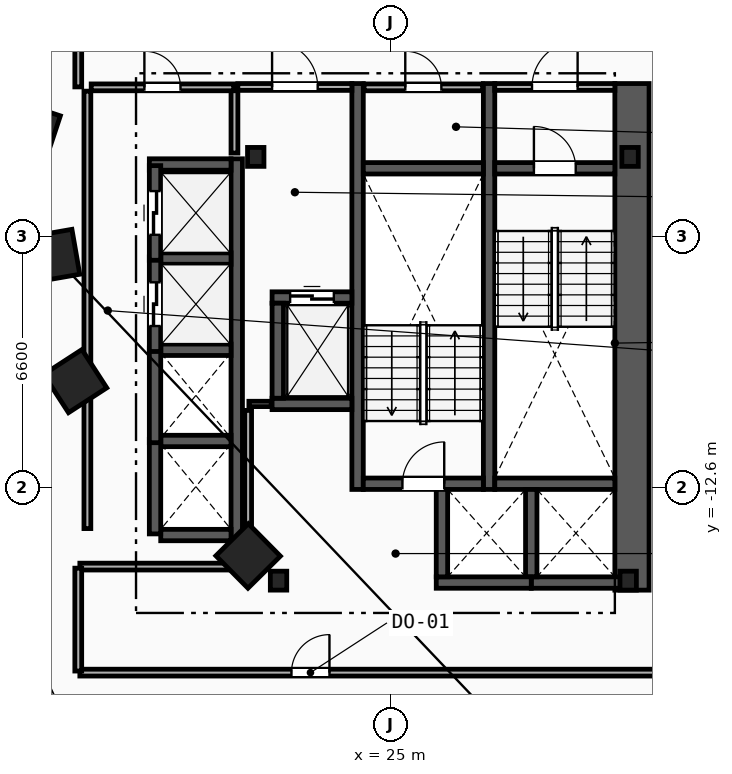
"""IFC4 building model, lengths in metres.
Left out: names, types, materials, properties, quantities, classifications, styles, units other than length and angle.
Written with IfcOpenShell. Run it as: python <this file> out.ifc"""

import sys

from ifc_helpers import new_model, si_unit, direction, frame, frame_2d, origin, origin_2d, place, context, subcontext, project, spatial, rectangle, i_section, extrude, element, fill, save


model = new_model("IFC4")
c1 = context("Model", 3, precision=1e-05, world=origin(), true_north=direction((0.0, 1.0)))
c2 = subcontext(c1, "Body", "Model", "MODEL_VIEW")
j1 = project(units=[si_unit("LENGTHUNIT", "METRE"), si_unit("PLANEANGLEUNIT", "RADIAN")], contexts=[c1])
p1 = place(None, origin())
s1 = spatial("IfcSite", under=j1, at=p1, CompositionType="ELEMENT")
p2 = place(p1, origin())
s2 = spatial("IfcBuilding", under=s1, at=p2, CompositionType="ELEMENT")
p3 = place(p2, frame((0.0, 0.0, 46.8)))
s3 = spatial("IfcBuildingStorey", under=s2, at=p3, CompositionType="ELEMENT", Elevation=46.8)
for number, where, z_axis, x_axis in (
    (1, (31.3, -3.9, 0.0), (0.0, 0.0, 1.0), (1.0, 0.0, 0.0)),
    (2, (21.45, -3.9, 0.0), (0.0, 0.0, 1.0), (1.0, 0.0, 0.0)),
    (3, (22.05, -15.05, 0.0), (0.0, 0.0, 1.0), (1.0, 0.0, 0.0)),
    (4, (31.25, -15.05, 0.0), (0.0, 0.0, 1.0), (1.0, 0.0, 0.0)),
):
    element("IfcColumn", number, at=place(p3, frame(where, z_axis=z_axis, x_axis=x_axis)), inside=s3, PredefinedType="COLUMN", context=c2, shape_type="SweptSolid", body=[
        extrude(i_section(OverallWidth=0.432, OverallDepth=0.498, WebThickness=0.056, FlangeThickness=0.089, FilletRadius=0.018, at=origin_2d()), origin(), (0.0, 0.0, 1.0), 3.8),
    ])
for number, where, z_axis, x_axis in (
    (5, (15.55, -3.2, 0.0), (0.0, 0.0, 1.0), (-0.315, -0.949, 0.0)),
    (6, (16.125, -6.5, 0.0), (0.0, 0.0, 1.0), (0.172, -0.985, 0.0)),
    (7, (16.7, -9.8, 0.0), (0.0, 0.0, 1.0), (0.544, -0.839, 0.0)),
    (8, (21.25, -14.4, 0.0), (0.0, 0.0, 1.0), (0.703, -0.711, 0.0)),
):
    element("IfcColumn", number, at=place(p3, frame(where, z_axis=z_axis, x_axis=x_axis)), inside=s3, PredefinedType="COLUMN", context=c2, shape_type="SweptSolid", body=[
        extrude(rectangle(XDim=1.2, YDim=1.2, at=origin_2d()), origin(), (0.0, 0.0, 1.0), 3.8),
    ])
p4 = place(p3, frame((31.35, -15.3, 0.0), z_axis=(0.0, 0.0, 1.0), x_axis=(0.0, 1.0, 0.0)))
e9 = element("IfcWall", 9, at=p4, inside=s3, PredefinedType="SHEAR", context=c2, shape_type="SweptSolid", body=[
    extrude(rectangle(XDim=13.33, YDim=0.9, at=frame_2d((6.665, 0.0))), origin(), (0.0, 0.0, 1.0), 3.5),
])
for number, where, z_axis, x_axis in (
    (10, (27.59, -12.65, 0.0), (0.0, 0.0, 1.0), (0.0, 1.0, 0.0)),
    (11, (24.13, -12.65, 0.0), (0.0, 0.0, 1.0), (0.0, 1.0, 0.0)),
):
    element("IfcWall", number, at=place(p3, frame(where, z_axis=z_axis, x_axis=x_axis)), inside=s3, PredefinedType="SHEAR", context=c2, shape_type="SweptSolid", body=[
        extrude(rectangle(XDim=10.68, YDim=0.3, at=frame_2d((5.34, 0.0))), origin(), (0.0, 0.0, 1.0), 3.5),
    ])
p5 = place(p3, frame((27.74, -4.2, 0.0), z_axis=(0.0, 0.0, 1.0), x_axis=(1.0, 0.0, 0.0)))
e12 = element("IfcWall", 12, at=p5, inside=s3, PredefinedType="SHEAR", context=c2, shape_type="SweptSolid", body=[
    extrude(rectangle(XDim=3.16, YDim=0.3, at=frame_2d((1.58, 0.0))), origin(), (0.0, 0.0, 1.0), 3.5),
])
p6 = place(p5, frame((1.03, 0.0, 0.0)))
e13 = element("IfcOpeningElement", 13, at=p6, cuts=e12, PredefinedType="OPENING", context=c2, shape_type="SweptSolid", body=[
    extrude(rectangle(XDim=1.1, YDim=2.15, at=frame_2d((0.55, 1.075))), frame((0.0, 0.16, 0.0), z_axis=(0.0, -1.0, 0.0), x_axis=(1.0, 0.0, 0.0)), (0.0, 0.0, 1.0), 0.32),
])
p7 = place(p3, frame((27.74, -12.5, 0.0), z_axis=(0.0, 0.0, 1.0), x_axis=(1.0, 0.0, 0.0)))
e14 = element("IfcWall", 14, at=p7, inside=s3, PredefinedType="SHEAR", context=c2, shape_type="SweptSolid", body=[
    extrude(rectangle(XDim=3.16, YDim=0.3, at=frame_2d((1.58, 0.0))), origin(), (0.0, 0.0, 1.0), 3.5),
])
p8 = place(p3, frame((24.28, -12.5, 0.0), z_axis=(0.0, 0.0, 1.0), x_axis=(1.0, 0.0, 0.0)))
e15 = element("IfcWall", 15, at=p8, inside=s3, PredefinedType="SHEAR", context=c2, shape_type="SweptSolid", body=[
    extrude(rectangle(XDim=3.16, YDim=0.3, at=frame_2d((1.58, 0.0))), origin(), (0.0, 0.0, 1.0), 3.5),
])
p9 = place(p8, frame((1.03, 0.0, 0.0)))
e16 = element("IfcOpeningElement", 16, at=p9, cuts=e15, PredefinedType="OPENING", context=c2, shape_type="SweptSolid", body=[
    extrude(rectangle(XDim=1.1, YDim=2.15, at=frame_2d((0.55, 1.075))), frame((0.0, 0.16, 0.0), z_axis=(0.0, -1.0, 0.0), x_axis=(1.0, 0.0, 0.0)), (0.0, 0.0, 1.0), 0.32),
])
p10 = place(p3, frame((24.28, -4.2, 0.0), z_axis=(0.0, 0.0, 1.0), x_axis=(1.0, 0.0, 0.0)))
e17 = element("IfcWall", 17, at=p10, inside=s3, PredefinedType="SHEAR", context=c2, shape_type="SweptSolid", body=[
    extrude(rectangle(XDim=3.16, YDim=0.3, at=frame_2d((1.58, 0.0))), origin(), (0.0, 0.0, 1.0), 3.5),
])
p11 = place(p3, frame((20.89, -3.8, 0.0), z_axis=(0.0, 0.0, 1.0), x_axis=(0.0, 1.0, 0.0)))
e18 = element("IfcWall", 18, at=p11, inside=s3, PredefinedType="PARTITIONING", context=c2, shape_type="SweptSolid", body=[
    extrude(rectangle(XDim=1.65, YDim=0.18, at=frame_2d((0.825, 0.0))), origin(), (0.0, 0.0, 1.0), 3.5),
])
p12 = place(p3, frame((20.98, -2.06, 0.0), z_axis=(0.0, 0.0, 1.0), x_axis=(1.0, 0.0, 0.0)))
e19 = element("IfcWall", 19, at=p12, inside=s3, PredefinedType="PARTITIONING", context=c2, shape_type="SweptSolid", body=[
    extrude(rectangle(XDim=3.0, YDim=0.18, at=frame_2d((1.5, 0.0))), origin(), (0.0, 0.0, 1.0), 3.5),
])
p13 = place(p12, frame((0.9, 0.0, 0.0)))
e20 = element("IfcOpeningElement", 20, at=p13, cuts=e19, PredefinedType="OPENING", context=c2, shape_type="SweptSolid", body=[
    extrude(rectangle(XDim=1.2, YDim=2.15, at=frame_2d((0.6, 1.075))), frame((0.0, 0.1, 0.0), z_axis=(0.0, -1.0, 0.0), x_axis=(1.0, 0.0, 0.0)), (0.0, 0.0, 1.0), 0.2),
])
p14 = place(p3, frame((27.74, -2.06, 0.0), z_axis=(0.0, 0.0, 1.0), x_axis=(1.0, 0.0, 0.0)))
e21 = element("IfcWall", 21, at=p14, inside=s3, PredefinedType="PARTITIONING", context=c2, shape_type="SweptSolid", body=[
    extrude(rectangle(XDim=3.16, YDim=0.18, at=frame_2d((1.58, 0.0))), origin(), (0.0, 0.0, 1.0), 3.5),
])
p15 = place(p14, frame((0.98, 0.0, 0.0)))
e22 = element("IfcOpeningElement", 22, at=p15, cuts=e21, PredefinedType="OPENING", context=c2, shape_type="SweptSolid", body=[
    extrude(rectangle(XDim=1.2, YDim=2.15, at=frame_2d((0.6, 1.075))), frame((0.0, 0.1, 0.0), z_axis=(0.0, -1.0, 0.0), x_axis=(1.0, 0.0, 0.0)), (0.0, 0.0, 1.0), 0.2),
])
p16 = place(p3, frame((21.88, -7.6, 0.0), z_axis=(0.0, 0.0, 1.0), x_axis=(1.0, 0.0, 0.0)))
e23 = element("IfcWall", 23, at=p16, inside=s3, PredefinedType="SHEAR", context=c2, shape_type="SweptSolid", body=[
    extrude(rectangle(XDim=2.1, YDim=0.3, at=frame_2d((1.05, 0.0))), origin(), (0.0, 0.0, 1.0), 3.5),
])
p17 = place(p16, frame((0.475, 0.0, 0.0)))
e24 = element("IfcOpeningElement", 24, at=p17, cuts=e23, PredefinedType="OPENING", context=c2, shape_type="SweptSolid", body=[
    extrude(rectangle(XDim=1.15, YDim=2.2, at=frame_2d((0.575, 1.1))), frame((0.0, 0.16, 0.0), z_axis=(0.0, -1.0, 0.0), x_axis=(1.0, 0.0, 0.0)), (0.0, 0.0, 1.0), 0.32),
])
p18 = place(p3, frame((21.88, -10.4, 0.0), z_axis=(0.0, 0.0, 1.0), x_axis=(1.0, 0.0, 0.0)))
e25 = element("IfcWall", 25, at=p18, inside=s3, PredefinedType="SHEAR", context=c2, shape_type="SweptSolid", body=[
    extrude(rectangle(XDim=2.1, YDim=0.3, at=frame_2d((1.05, 0.0))), origin(), (0.0, 0.0, 1.0), 3.5),
])
for number, where, z_axis, x_axis in (
    (26, (22.03, -10.25, 0.0), (0.0, 0.0, 1.0), (0.0, 1.0, 0.0)),
    (27, (28.7, -15.1, 0.0), (0.0, 0.0, 1.0), (1.0, 0.0, 0.0)),
):
    element("IfcWall", number, at=place(p3, frame(where, z_axis=z_axis, x_axis=x_axis)), inside=s3, PredefinedType="SHEAR", context=c2, shape_type="SweptSolid", body=[
        extrude(rectangle(XDim=2.5, YDim=0.3, at=frame_2d((1.25, 0.0))), origin(), (0.0, 0.0, 1.0), 3.5),
    ])
p19 = place(p3, frame((28.7, -14.95, 0.0), z_axis=(0.0, 0.0, 1.0), x_axis=(0.0, 1.0, 0.0)))
e28 = element("IfcWall", 28, at=p19, inside=s3, PredefinedType="SHEAR", context=c2, shape_type="SweptSolid", body=[
    extrude(rectangle(XDim=2.3, YDim=0.3, at=frame_2d((1.15, 0.0))), origin(), (0.0, 0.0, 1.0), 3.5),
])
p20 = place(p3, frame((26.2, -15.1, 0.0), z_axis=(0.0, 0.0, 1.0), x_axis=(1.0, 0.0, 0.0)))
e29 = element("IfcWall", 29, at=p20, inside=s3, PredefinedType="SHEAR", context=c2, shape_type="SweptSolid", body=[
    extrude(rectangle(XDim=2.5, YDim=0.3, at=frame_2d((1.25, 0.0))), origin(), (0.0, 0.0, 1.0), 3.5),
])
p21 = place(p3, frame((26.35, -14.95, 0.0), z_axis=(0.0, 0.0, 1.0), x_axis=(0.0, 1.0, 0.0)))
e30 = element("IfcWall", 30, at=p21, inside=s3, PredefinedType="SHEAR", context=c2, shape_type="SweptSolid", body=[
    extrude(rectangle(XDim=2.3, YDim=0.3, at=frame_2d((1.15, 0.0))), origin(), (0.0, 0.0, 1.0), 3.5),
])
p22 = place(p3, frame((20.95, -14.0, 0.0), z_axis=(0.0, 0.0, 1.0), x_axis=(0.0, 1.0, 0.0)))
e31 = element("IfcWall", 31, at=p22, inside=s3, PredefinedType="SHEAR", context=c2, shape_type="SweptSolid", body=[
    extrude(rectangle(XDim=10.05, YDim=0.3, at=frame_2d((5.025, 0.0))), origin(), (0.0, 0.0, 1.0), 3.5),
])
p23 = place(p3, frame((18.95, -13.85, 0.0), z_axis=(0.0, 0.0, 1.0), x_axis=(1.0, 0.0, 0.0)))
e32 = element("IfcWall", 32, at=p23, inside=s3, PredefinedType="SHEAR", context=c2, shape_type="SweptSolid", body=[
    extrude(rectangle(XDim=1.85, YDim=0.3, at=frame_2d((0.925, 0.0))), origin(), (0.0, 0.0, 1.0), 3.5),
])
p24 = place(p3, frame((18.65, -4.1, 0.0), z_axis=(0.0, 0.0, 1.0), x_axis=(1.0, 0.0, 0.0)))
e33 = element("IfcWall", 33, at=p24, inside=s3, PredefinedType="SHEAR", context=c2, shape_type="SweptSolid", body=[
    extrude(rectangle(XDim=2.15, YDim=0.3, at=frame_2d((1.075, 0.0))), origin(), (0.0, 0.0, 1.0), 3.5),
])
for number, where, z_axis, x_axis in (
    (34, (18.95, -11.375, 0.0), (0.0, 0.0, 1.0), (1.0, 0.0, 0.0)),
    (35, (18.95, -8.975, 0.0), (0.0, 0.0, 1.0), (1.0, 0.0, 0.0)),
    (36, (18.95, -6.575, 0.0), (0.0, 0.0, 1.0), (1.0, 0.0, 0.0)),
):
    element("IfcWall", number, at=place(p3, frame(where, z_axis=z_axis, x_axis=x_axis)), inside=s3, PredefinedType="SHEAR", context=c2, shape_type="SweptSolid", body=[
        extrude(rectangle(XDim=1.85, YDim=0.3, at=frame_2d((0.925, 0.0))), origin(), (0.0, 0.0, 1.0), 3.5),
    ])
for number, where, z_axis, x_axis in (
    (37, (18.8, -13.82, 0.0), (0.0, 0.0, 1.0), (0.0, 1.0, 0.0)),
    (38, (18.8, -11.42, 0.0), (0.0, 0.0, 1.0), (0.0, 1.0, 0.0)),
):
    element("IfcWall", number, at=place(p3, frame(where, z_axis=z_axis, x_axis=x_axis)), inside=s3, PredefinedType="SHEAR", context=c2, shape_type="SweptSolid", body=[
        extrude(rectangle(XDim=2.49, YDim=0.3, at=frame_2d((1.245, 0.0))), origin(), (0.0, 0.0, 1.0), 3.5),
    ])
p25 = place(p3, frame((18.8, -9.02, 0.0), z_axis=(0.0, 0.0, 1.0), x_axis=(0.0, 1.0, 0.0)))
e39 = element("IfcWall", 39, at=p25, inside=s3, PredefinedType="SHEAR", context=c2, shape_type="SweptSolid", body=[
    extrude(rectangle(XDim=2.49, YDim=0.3, at=frame_2d((1.245, 0.0))), origin(), (0.0, 0.0, 1.0), 3.5),
])
p26 = place(p25, frame((0.67, 0.0, 0.0)))
e40 = element("IfcOpeningElement", 40, at=p26, cuts=e39, PredefinedType="OPENING", context=c2, shape_type="SweptSolid", body=[
    extrude(rectangle(XDim=1.15, YDim=2.2, at=frame_2d((0.575, 1.1))), frame((0.0, 0.16, 0.0), z_axis=(0.0, -1.0, 0.0), x_axis=(1.0, 0.0, 0.0)), (0.0, 0.0, 1.0), 0.32),
])
p27 = place(p3, frame((18.8, -6.62, 0.0), z_axis=(0.0, 0.0, 1.0), x_axis=(0.0, 1.0, 0.0)))
e41 = element("IfcWall", 41, at=p27, inside=s3, PredefinedType="SHEAR", context=c2, shape_type="SweptSolid", body=[
    extrude(rectangle(XDim=2.49, YDim=0.3, at=frame_2d((1.245, 0.0))), origin(), (0.0, 0.0, 1.0), 3.5),
])
p28 = place(p27, frame((0.67, 0.0, 0.0)))
e42 = element("IfcOpeningElement", 42, at=p28, cuts=e41, PredefinedType="OPENING", context=c2, shape_type="SweptSolid", body=[
    extrude(rectangle(XDim=1.15, YDim=2.2, at=frame_2d((0.575, 1.1))), frame((0.0, 0.16, 0.0), z_axis=(0.0, -1.0, 0.0), x_axis=(1.0, 0.0, 0.0)), (0.0, 0.0, 1.0), 0.32),
])
p29 = place(p3, frame((17.02, -13.68, 0.0), z_axis=(0.0, 0.0, 1.0), x_axis=(0.0, 1.0, 0.0)))
e43 = element("IfcWall", 43, at=p29, inside=s3, PredefinedType="PARTITIONING", context=c2, shape_type="SweptSolid", body=[
    extrude(rectangle(XDim=11.51, YDim=0.18, at=frame_2d((5.755, 0.0))), origin(), (0.0, 0.0, 1.0), 3.5),
])
p30 = place(p3, frame((17.12, -2.07, 0.0), z_axis=(0.0, 0.0, 1.0), x_axis=(1.0, 0.0, 0.0)))
e44 = element("IfcWall", 44, at=p30, inside=s3, PredefinedType="PARTITIONING", context=c2, shape_type="SweptSolid", body=[
    extrude(rectangle(XDim=3.75, YDim=0.18, at=frame_2d((1.875, 0.0))), origin(), (0.0, 0.0, 1.0), 3.5),
])
p31 = place(p30, frame((1.4, 0.0, 0.0)))
e45 = element("IfcOpeningElement", 45, at=p31, cuts=e44, PredefinedType="OPENING", context=c2, shape_type="SweptSolid", body=[
    extrude(rectangle(XDim=0.95, YDim=2.1, at=frame_2d((0.475, 1.05))), frame((0.0, 0.1, 0.0), z_axis=(0.0, -1.0, 0.0), x_axis=(1.0, 0.0, 0.0)), (0.0, 0.0, 1.0), 0.2),
])
p32 = place(p3, frame((21.27, -10.4, 0.0), z_axis=(0.0, 0.0, 1.0), x_axis=(1.0, 0.0, 0.0)))
e46 = element("IfcWall", 46, at=p32, inside=s3, PredefinedType="PARTITIONING", context=c2, shape_type="SweptSolid", body=[
    extrude(rectangle(XDim=0.59, YDim=0.14, at=frame_2d((0.295, 0.0))), origin(), (0.0, 0.0, 1.0), 3.5),
])
p33 = place(p3, frame((21.25, -14.93, 0.0), z_axis=(0.0, 0.0, 1.0), x_axis=(0.0, 1.0, 0.0)))
e47 = element("IfcWall", 47, at=p33, inside=s3, PredefinedType="PARTITIONING", context=c2, shape_type="SweptSolid", body=[
    extrude(rectangle(XDim=4.36, YDim=0.18, at=frame_2d((2.18, 0.0))), origin(), (0.0, 0.0, 1.0), 3.5),
])
p34 = place(p3, frame((24.3, -2.07, 0.0), z_axis=(0.0, 0.0, 1.0), x_axis=(1.0, 0.0, 0.0)))
e48 = element("IfcWall", 48, at=p34, inside=s3, PredefinedType="PARTITIONING", context=c2, shape_type="SweptSolid", body=[
    extrude(rectangle(XDim=3.12, YDim=0.18, at=frame_2d((1.56, 0.0))), origin(), (0.0, 0.0, 1.0), 3.5),
])
p35 = place(p34, frame((1.085, 0.0, 0.0)))
e49 = element("IfcOpeningElement", 49, at=p35, cuts=e48, PredefinedType="OPENING", context=c2, shape_type="SweptSolid", body=[
    extrude(rectangle(XDim=0.95, YDim=2.1, at=frame_2d((0.475, 1.05))), frame((0.0, 0.1, 0.0), z_axis=(0.0, -1.0, 0.0), x_axis=(1.0, 0.0, 0.0)), (0.0, 0.0, 1.0), 0.2),
])
p36 = place(p3, frame((16.822, -17.47, 0.0), z_axis=(0.0, 0.0, 1.0), x_axis=(1.0, 0.0, 0.0)))
e50 = element("IfcWall", 50, at=p36, inside=s3, PredefinedType="PARTITIONING", context=c2, shape_type="SweptSolid", body=[
    extrude(rectangle(XDim=16.807, YDim=0.18, at=frame_2d((8.403, 0.0))), origin(), (0.0, 0.0, 1.0), 3.5),
])
p37 = place(p36, frame((5.569, 0.0, 0.0)))
e51 = element("IfcOpeningElement", 51, at=p37, cuts=e50, PredefinedType="OPENING", context=c2, shape_type="SweptSolid", body=[
    extrude(rectangle(XDim=1.0, YDim=2.15, at=frame_2d((0.5, 1.075))), frame((0.0, 0.1, 0.0), z_axis=(0.0, -1.0, 0.0), x_axis=(1.0, 0.0, 0.0)), (0.0, 0.0, 1.0), 0.2),
])
p38 = place(p3, frame((21.178, -14.68, 0.0), z_axis=(0.0, 0.0, 1.0), x_axis=(-1.0, 0.0, 0.0)))
e52 = element("IfcWall", 52, at=p38, inside=s3, PredefinedType="PARTITIONING", context=c2, shape_type="SweptSolid", body=[
    extrude(rectangle(XDim=4.357, YDim=0.18, at=frame_2d((2.178, 0.0))), origin(), (0.0, 0.0, 1.0), 3.5),
])
p39 = place(p3, frame((16.78, -14.721, 0.0), z_axis=(0.0, 0.0, 1.0), x_axis=(0.0, -1.0, 0.0)))
e53 = element("IfcWall", 53, at=p39, inside=s3, PredefinedType="PARTITIONING", context=c2, shape_type="SweptSolid", body=[
    extrude(rectangle(XDim=2.707, YDim=0.18, at=frame_2d((1.354, 0.0))), origin(), (0.0, 0.0, 1.0), 3.5),
])
p40 = place(p3, frame((16.78, 0.329, 0.0), z_axis=(0.0, 0.0, 1.0), x_axis=(0.0, -1.0, 0.0)))
e54 = element("IfcWall", 54, at=p40, inside=s3, PredefinedType="PARTITIONING", context=c2, shape_type="SweptSolid", body=[
    extrude(rectangle(XDim=2.387, YDim=0.18, at=frame_2d((1.194, 0.0))), origin(), (0.0, 0.0, 1.0), 3.5),
])
p41 = place(p6, origin())
e55 = element("IfcDoor", 55, at=p41, inside=s3, OperationType="SINGLE_SWING_LEFT", PredefinedType="DOOR", context=c2, shape_type="SweptSolid", body=[
    extrude(rectangle(XDim=1.1, YDim=2.15, at=frame_2d((0.55, 1.075))), frame((0.0, 0.025, 0.0), z_axis=(0.0, -1.0, 0.0), x_axis=(1.0, 0.0, 0.0)), (0.0, 0.0, 1.0), 0.05),
])
fill(e13, e55)
p42 = place(p9, origin())
e56 = element("IfcDoor", 56, at=p42, inside=s3, OperationType="SINGLE_SWING_RIGHT", PredefinedType="DOOR", context=c2, shape_type="SweptSolid", body=[
    extrude(rectangle(XDim=1.1, YDim=2.15, at=frame_2d((0.55, 1.075))), frame((0.0, 0.025, 0.0), z_axis=(0.0, -1.0, 0.0), x_axis=(1.0, 0.0, 0.0)), (0.0, 0.0, 1.0), 0.05),
])
fill(e16, e56)
p43 = place(p13, origin())
e57 = element("IfcDoor", 57, at=p43, inside=s3, OperationType="SINGLE_SWING_LEFT", PredefinedType="DOOR", context=c2, shape_type="SweptSolid", body=[
    extrude(rectangle(XDim=1.2, YDim=2.15, at=frame_2d((0.6, 1.075))), frame((0.0, 0.025, 0.0), z_axis=(0.0, -1.0, 0.0), x_axis=(1.0, 0.0, 0.0)), (0.0, 0.0, 1.0), 0.05),
])
fill(e20, e57)
p44 = place(p15, origin())
e58 = element("IfcDoor", 58, at=p44, inside=s3, OperationType="SINGLE_SWING_RIGHT", PredefinedType="DOOR", context=c2, shape_type="SweptSolid", body=[
    extrude(rectangle(XDim=1.2, YDim=2.15, at=frame_2d((0.6, 1.075))), frame((0.0, 0.025, 0.0), z_axis=(0.0, -1.0, 0.0), x_axis=(1.0, 0.0, 0.0)), (0.0, 0.0, 1.0), 0.05),
])
fill(e22, e58)
p45 = place(p17, origin())
e59 = element("IfcDoor", 59, at=p45, inside=s3, OperationType="SLIDING_TO_LEFT", PredefinedType="TRAPDOOR", context=c2, shape_type="SweptSolid", body=[
    extrude(rectangle(XDim=1.15, YDim=2.2, at=frame_2d((0.575, 1.1))), frame((0.0, 0.025, 0.0), z_axis=(0.0, -1.0, 0.0), x_axis=(1.0, 0.0, 0.0)), (0.0, 0.0, 1.0), 0.05),
])
fill(e24, e59)
p46 = place(p26, origin())
e60 = element("IfcDoor", 60, at=p46, inside=s3, OperationType="SLIDING_TO_LEFT", PredefinedType="TRAPDOOR", context=c2, shape_type="SweptSolid", body=[
    extrude(rectangle(XDim=1.15, YDim=2.2, at=frame_2d((0.575, 1.1))), frame((0.0, 0.025, 0.0), z_axis=(0.0, -1.0, 0.0), x_axis=(1.0, 0.0, 0.0)), (0.0, 0.0, 1.0), 0.05),
])
fill(e40, e60)
p47 = place(p28, origin())
e61 = element("IfcDoor", 61, at=p47, inside=s3, OperationType="SLIDING_TO_LEFT", PredefinedType="TRAPDOOR", context=c2, shape_type="SweptSolid", body=[
    extrude(rectangle(XDim=1.15, YDim=2.2, at=frame_2d((0.575, 1.1))), frame((0.0, 0.025, 0.0), z_axis=(0.0, -1.0, 0.0), x_axis=(1.0, 0.0, 0.0)), (0.0, 0.0, 1.0), 0.05),
])
fill(e42, e61)
p48 = place(p37, origin())
e62 = element("IfcDoor", 62, at=p48, inside=s3, OperationType="SINGLE_SWING_RIGHT", PredefinedType="DOOR", context=c2, shape_type="SweptSolid", body=[
    extrude(rectangle(XDim=1.0, YDim=2.15, at=frame_2d((0.5, 1.075))), frame((0.0, 0.025, 0.0), z_axis=(0.0, -1.0, 0.0), x_axis=(1.0, 0.0, 0.0)), (0.0, 0.0, 1.0), 0.05),
])
fill(e51, e62)
p49 = place(p31, origin())
e63 = element("IfcDoor", 63, at=p49, inside=s3, OperationType="SINGLE_SWING_LEFT", PredefinedType="DOOR", context=c2, shape_type="SweptSolid", body=[
    extrude(rectangle(XDim=0.95, YDim=2.1, at=frame_2d((0.475, 1.05))), frame((0.0, 0.025, 0.0), z_axis=(0.0, -1.0, 0.0), x_axis=(1.0, 0.0, 0.0)), (0.0, 0.0, 1.0), 0.05),
])
fill(e45, e63)
p50 = place(p35, origin())
e64 = element("IfcDoor", 64, at=p50, inside=s3, OperationType="SINGLE_SWING_LEFT", PredefinedType="DOOR", context=c2, shape_type="SweptSolid", body=[
    extrude(rectangle(XDim=0.95, YDim=2.1, at=frame_2d((0.475, 1.05))), frame((0.0, 0.025, 0.0), z_axis=(0.0, -1.0, 0.0), x_axis=(1.0, 0.0, 0.0)), (0.0, 0.0, 1.0), 0.05),
])
fill(e49, e64)
save(model, sys.argv[1])
